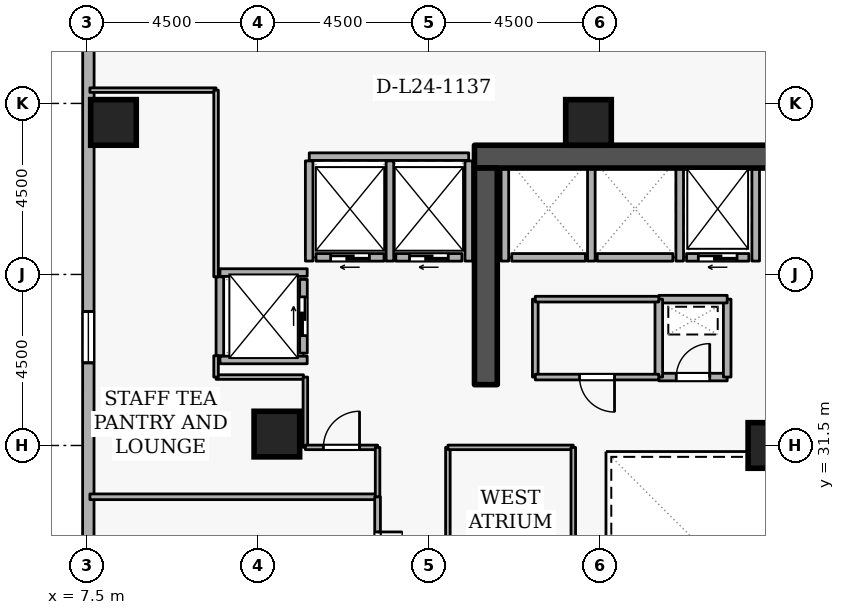
"""IFC4 building model, lengths in metres.
Left out: names, types, materials, properties, quantities, classifications, styles, units other than length and angle.
Written with IfcOpenShell. Run it as: python <this file> out.ifc"""

import sys

from ifc_helpers import new_model, si_unit, direction, frame, frame_2d, origin, origin_2d, place, context, subcontext, project, spatial, rectangle, extrude, element, fill, save


model = new_model("IFC4")
c1 = context("Model", 3, precision=1e-05, world=origin(), true_north=direction((0.0, 1.0)))
c2 = subcontext(c1, "Body", "Model", "MODEL_VIEW")
j1 = project(units=[si_unit("LENGTHUNIT", "METRE"), si_unit("PLANEANGLEUNIT", "RADIAN")], contexts=[c1])
p1 = place(None, origin())
s1 = spatial("IfcSite", under=j1, at=p1, CompositionType="ELEMENT")
p2 = place(p1, origin())
s2 = spatial("IfcBuilding", under=s1, at=p2, CompositionType="ELEMENT")
p3 = place(p2, frame((0.0, 0.0, 94.5)))
s3 = spatial("IfcBuildingStorey", under=s2, at=p3, CompositionType="ELEMENT", Elevation=94.5)
p4 = place(p3, frame((17.7, 39.1, 0.0), z_axis=(0.0, 0.0, 1.0), x_axis=(1.0, 0.0, 0.0)))
e1 = element("IfcWall", 1, at=p4, inside=s3, PredefinedType="SHEAR", context=c2, shape_type="SweptSolid", body=[
    extrude(rectangle(XDim=15.6, YDim=0.6, at=frame_2d((7.8, 0.0))), origin(), (0.0, 0.0, 1.0), 3.6),
])
p5 = place(p3, frame((18.0, 33.1, 0.0), z_axis=(0.0, 0.0, 1.0), x_axis=(0.0, 1.0, 0.0)))
e2 = element("IfcWall", 2, at=p5, inside=s3, PredefinedType="SHEAR", context=c2, shape_type="SweptSolid", body=[
    extrude(rectangle(XDim=5.7, YDim=0.6, at=frame_2d((2.85, 0.0))), origin(), (0.0, 0.0, 1.0), 3.6),
])
for number, where, z_axis, x_axis in (
    (3, (8.2, 40.0, 0.0), (0.0, 0.0, 1.0), (1.0, 0.0, 0.0)),
    (4, (12.5, 31.8, 0.0), (0.0, 0.0, 1.0), (1.0, 0.0, 0.0)),
    (5, (20.7, 40.0, 0.0), (0.0, 0.0, 1.0), (1.0, 0.0, 0.0)),
    (6, (25.5, 31.5, 0.0), (0.0, 0.0, 1.0), (1.0, 0.0, 0.0)),
):
    element("IfcColumn", number, at=place(p3, frame(where, z_axis=z_axis, x_axis=x_axis)), inside=s3, PredefinedType="COLUMN", context=c2, shape_type="SweptSolid", body=[
        extrude(rectangle(XDim=1.2, YDim=1.2, at=origin_2d()), origin(), (0.0, 0.0, 1.0), 3.6),
    ])
p6 = place(p3, frame((7.542, 46.425, 0.0), z_axis=(0.0, 0.0, 1.0), x_axis=(-0.000182370391, -0.999999983371, 0.0)))
e7 = element("IfcWall", 7, at=p6, inside=s3, PredefinedType="STANDARD", context=c2, shape_type="SweptSolid", body=[
    extrude(rectangle(XDim=34.806, YDim=0.3, at=frame_2d((17.403, 0.0))), origin(), (0.0, 0.0, 1.0), 2.22),
])
p7 = place(p6, frame((1.8, 0.0, 0.72)))
e8 = element("IfcOpeningElement", 8, at=p7, cuts=e7, PredefinedType="OPENING", context=c2, shape_type="SweptSolid", body=[
    extrude(rectangle(XDim=1.35, YDim=1.05, at=frame_2d((0.675, 0.525))), frame((0.0, 0.16, 0.0), z_axis=(0.0, -1.0, 0.0), x_axis=(1.0, 0.0, 0.0)), (0.0, 0.0, 1.0), 0.32),
])
p8 = place(p6, frame((11.4, 0.0, 0.72)))
e9 = element("IfcOpeningElement", 9, at=p8, cuts=e7, PredefinedType="OPENING", context=c2, shape_type="SweptSolid", body=[
    extrude(rectangle(XDim=1.35, YDim=1.05, at=frame_2d((0.675, 0.525))), frame((0.0, 0.16, 0.0), z_axis=(0.0, -1.0, 0.0), x_axis=(1.0, 0.0, 0.0)), (0.0, 0.0, 1.0), 0.32),
])
p9 = place(p6, frame((21.0, 0.0, 0.72)))
e10 = element("IfcOpeningElement", 10, at=p9, cuts=e7, PredefinedType="OPENING", context=c2, shape_type="SweptSolid", body=[
    extrude(rectangle(XDim=1.35, YDim=1.05, at=frame_2d((0.675, 0.525))), frame((0.0, 0.16, 0.0), z_axis=(0.0, -1.0, 0.0), x_axis=(1.0, 0.0, 0.0)), (0.0, 0.0, 1.0), 0.32),
])
p10 = place(p6, frame((25.8, 0.0, 0.72)))
e11 = element("IfcOpeningElement", 11, at=p10, cuts=e7, PredefinedType="OPENING", context=c2, shape_type="SweptSolid", body=[
    extrude(rectangle(XDim=1.35, YDim=1.05, at=frame_2d((0.675, 0.525))), frame((0.0, 0.16, 0.0), z_axis=(0.0, -1.0, 0.0), x_axis=(1.0, 0.0, 0.0)), (0.0, 0.0, 1.0), 0.32),
])
p11 = place(p3, frame((24.92, 36.45, 0.0), z_axis=(0.0, 0.0, 1.0), x_axis=(-1.0, 0.0, 0.0)))
e12 = element("IfcWall", 12, at=p11, inside=s3, PredefinedType="STANDARD", context=c2, shape_type="SweptSolid", body=[
    extrude(rectangle(XDim=1.64, YDim=0.2, at=frame_2d((0.82, 0.0))), origin(), (0.0, 0.0, 1.0), 3.3),
])
p12 = place(p11, frame((0.31, 0.0, 0.0)))
e13 = element("IfcOpeningElement", 13, at=p12, cuts=e12, PredefinedType="OPENING", context=c2, shape_type="SweptSolid", body=[
    extrude(rectangle(XDim=1.02, YDim=2.06, at=frame_2d((0.51, 1.03))), frame((0.0, 0.11, 0.0), z_axis=(0.0, -1.0, 0.0), x_axis=(1.0, 0.0, 0.0)), (0.0, 0.0, 1.0), 0.22),
])
p13 = place(p3, frame((22.92, 36.45, 0.0), z_axis=(0.0, 0.0, 1.0), x_axis=(-1.0, 0.0, 0.0)))
e14 = element("IfcWall", 14, at=p13, inside=s3, PredefinedType="STANDARD", context=c2, shape_type="SweptSolid", body=[
    extrude(rectangle(XDim=1.99, YDim=0.2, at=frame_2d((0.995, 0.0))), origin(), (0.0, 0.0, 1.0), 3.3),
])
p14 = place(p3, frame((20.62, 36.45, 0.0), z_axis=(0.0, 0.0, 1.0), x_axis=(-1.0, 0.0, 0.0)))
e15 = element("IfcWall", 15, at=p14, inside=s3, PredefinedType="STANDARD", context=c2, shape_type="SweptSolid", body=[
    extrude(rectangle(XDim=1.94, YDim=0.2, at=frame_2d((0.97, 0.0))), origin(), (0.0, 0.0, 1.0), 3.3),
])
p15 = place(p3, frame((17.37, 36.45, 0.0), z_axis=(0.0, 0.0, 1.0), x_axis=(-1.0, 0.0, 0.0)))
e16 = element("IfcWall", 16, at=p15, inside=s3, PredefinedType="STANDARD", context=c2, shape_type="SweptSolid", body=[
    extrude(rectangle(XDim=1.74, YDim=0.2, at=frame_2d((0.87, 0.0))), origin(), (0.0, 0.0, 1.0), 3.3),
])
p16 = place(p15, frame((0.36, 0.0, 0.0)))
e17 = element("IfcOpeningElement", 17, at=p16, cuts=e16, PredefinedType="OPENING", context=c2, shape_type="SweptSolid", body=[
    extrude(rectangle(XDim=1.02, YDim=2.06, at=frame_2d((0.51, 1.03))), frame((0.0, 0.11, 0.0), z_axis=(0.0, -1.0, 0.0), x_axis=(1.0, 0.0, 0.0)), (0.0, 0.0, 1.0), 0.22),
])
p17 = place(p3, frame((15.32, 36.45, 0.0), z_axis=(0.0, 0.0, 1.0), x_axis=(-1.0, 0.0, 0.0)))
e18 = element("IfcWall", 18, at=p17, inside=s3, PredefinedType="STANDARD", context=c2, shape_type="SweptSolid", body=[
    extrude(rectangle(XDim=1.79, YDim=0.2, at=frame_2d((0.895, 0.0))), origin(), (0.0, 0.0, 1.0), 3.3),
])
p18 = place(p17, frame((0.385, 0.0, 0.0)))
e19 = element("IfcOpeningElement", 19, at=p18, cuts=e18, PredefinedType="OPENING", context=c2, shape_type="SweptSolid", body=[
    extrude(rectangle(XDim=1.02, YDim=2.06, at=frame_2d((0.51, 1.03))), frame((0.0, 0.11, 0.0), z_axis=(0.0, -1.0, 0.0), x_axis=(1.0, 0.0, 0.0)), (0.0, 0.0, 1.0), 0.22),
])
p19 = place(p3, frame((13.2, 33.93, 0.0), z_axis=(0.0, 0.0, 1.0), x_axis=(0.0, 1.0, 0.0)))
e20 = element("IfcWall", 20, at=p19, inside=s3, PredefinedType="STANDARD", context=c2, shape_type="SweptSolid", body=[
    extrude(rectangle(XDim=1.94, YDim=0.2, at=frame_2d((0.97, 0.0))), origin(), (0.0, 0.0, 1.0), 3.3),
])
p20 = place(p19, frame((0.46, 0.0, 0.0)))
e21 = element("IfcOpeningElement", 21, at=p20, cuts=e20, PredefinedType="OPENING", context=c2, shape_type="SweptSolid", body=[
    extrude(rectangle(XDim=1.02, YDim=2.06, at=frame_2d((0.51, 1.03))), frame((0.0, 0.11, 0.0), z_axis=(0.0, -1.0, 0.0), x_axis=(1.0, 0.0, 0.0)), (0.0, 0.0, 1.0), 0.22),
])
p21 = place(p3, frame((25.1, 36.352, 0.0), z_axis=(0.0, 0.0, 1.0), x_axis=(0.0, 1.0, 0.0)))
e22 = element("IfcWall", 22, at=p21, inside=s3, PredefinedType="STANDARD", context=c2, shape_type="SweptSolid", body=[
    extrude(rectangle(XDim=2.436, YDim=0.2, at=frame_2d((1.218, 0.0))), origin(), (0.0, 0.0, 1.0), 1.685),
])
for number, where, z_axis, x_axis in (
    (23, (23.1, 36.352, 0.0), (0.0, 0.0, 1.0), (0.0, 1.0, 0.0)),
    (24, (20.775, 36.352, 0.0), (0.0, 0.0, 1.0), (0.0, 1.0, 0.0)),
    (25, (18.5, 36.352, 0.0), (0.0, 0.0, 1.0), (0.0, 1.0, 0.0)),
):
    element("IfcWall", number, at=place(p3, frame(where, z_axis=z_axis, x_axis=x_axis)), inside=s3, PredefinedType="STANDARD", context=c2, shape_type="SweptSolid", body=[
        extrude(rectangle(XDim=2.436, YDim=0.2, at=frame_2d((1.218, 0.0))), origin(), (0.0, 0.0, 1.0), 3.3),
    ])
p22 = place(p3, frame((13.352, 39.1, 0.0), z_axis=(0.0, 0.0, 1.0), x_axis=(1.0, 0.0, 0.0)))
e26 = element("IfcWall", 26, at=p22, inside=s3, PredefinedType="STANDARD", context=c2, shape_type="SweptSolid", body=[
    extrude(rectangle(XDim=4.196, YDim=0.2, at=frame_2d((2.098, 0.0))), origin(), (0.0, 0.0, 1.0), 3.3),
])
p23 = place(p3, frame((17.55, 36.352, 0.0), z_axis=(0.0, 0.0, 1.0), x_axis=(0.0, 1.0, 0.0)))
e27 = element("IfcWall", 27, at=p23, inside=s3, PredefinedType="STANDARD", context=c2, shape_type="SweptSolid", body=[
    extrude(rectangle(XDim=2.636, YDim=0.2, at=frame_2d((1.318, 0.0))), origin(), (0.0, 0.0, 1.0), 2.505),
])
for number, where, z_axis, x_axis in (
    (28, (15.475, 36.352, 0.0), (0.0, 0.0, 1.0), (0.0, 1.0, 0.0)),
    (29, (13.35, 36.352, 0.0), (0.0, 0.0, 1.0), (0.0, 1.0, 0.0)),
):
    element("IfcWall", number, at=place(p3, frame(where, z_axis=z_axis, x_axis=x_axis)), inside=s3, PredefinedType="STANDARD", context=c2, shape_type="SweptSolid", body=[
        extrude(rectangle(XDim=2.636, YDim=0.2, at=frame_2d((1.318, 0.0))), origin(), (0.0, 0.0, 1.0), 3.3),
    ])
for number, where, z_axis, x_axis in (
    (30, (11.002, 36.05, 0.0), (0.0, 0.0, 1.0), (1.0, 0.0, 0.0)),
    (31, (11.002, 33.75, 0.0), (0.0, 0.0, 1.0), (1.0, 0.0, 0.0)),
):
    element("IfcWall", number, at=place(p3, frame(where, z_axis=z_axis, x_axis=x_axis)), inside=s3, PredefinedType="STANDARD", context=c2, shape_type="SweptSolid", body=[
        extrude(rectangle(XDim=2.296, YDim=0.2, at=frame_2d((1.148, 0.0))), origin(), (0.0, 0.0, 1.0), 3.3),
    ])
p24 = place(p3, frame((11.0, 33.862, 0.0), z_axis=(0.0, 0.0, 1.0), x_axis=(0.0, 1.0, 0.0)))
e32 = element("IfcWall", 32, at=p24, inside=s3, PredefinedType="STANDARD", context=c2, shape_type="SweptSolid", body=[
    extrude(rectangle(XDim=2.076, YDim=0.2, at=frame_2d((1.038, 0.0))), origin(), (0.0, 0.0, 1.0), 3.3),
])
p25 = place(p3, frame((22.55, 33.3, 0.0), z_axis=(0.0, 0.0, 1.0), x_axis=(1.0, 0.0, 0.0)))
e33 = element("IfcWall", 33, at=p25, inside=s3, PredefinedType="STANDARD", context=c2, shape_type="SweptSolid", body=[
    extrude(rectangle(XDim=1.8, YDim=0.2, at=frame_2d((0.9, 0.0))), origin(), (0.0, 0.0, 1.0), 3.3),
])
p26 = place(p25, frame((0.46, 0.0, 0.0)))
e34 = element("IfcOpeningElement", 34, at=p26, cuts=e33, PredefinedType="OPENING", context=c2, shape_type="SweptSolid", body=[
    extrude(rectangle(XDim=0.88, YDim=2.04, at=frame_2d((0.44, 1.02))), frame((0.0, 0.11, 0.0), z_axis=(0.0, -1.0, 0.0), x_axis=(1.0, 0.0, 0.0)), (0.0, 0.0, 1.0), 0.22),
])
p27 = place(p3, frame((24.35, 33.3, 0.0), z_axis=(0.0, 0.0, 1.0), x_axis=(0.0, 1.0, 0.0)))
e35 = element("IfcWall", 35, at=p27, inside=s3, PredefinedType="STANDARD", context=c2, shape_type="SweptSolid", body=[
    extrude(rectangle(XDim=2.05, YDim=0.2, at=frame_2d((1.025, 0.0))), origin(), (0.0, 0.0, 1.0), 3.3),
])
p28 = place(p3, frame((24.35, 35.35, 0.0), z_axis=(0.0, 0.0, 1.0), x_axis=(-1.0, 0.0, 0.0)))
e36 = element("IfcWall", 36, at=p28, inside=s3, PredefinedType="STANDARD", context=c2, shape_type="SweptSolid", body=[
    extrude(rectangle(XDim=1.8, YDim=0.2, at=frame_2d((0.9, 0.0))), origin(), (0.0, 0.0, 1.0), 3.3),
])
p29 = place(p3, frame((22.55, 35.35, 0.0), z_axis=(0.0, 0.0, 1.0), x_axis=(0.0, -1.0, 0.0)))
e37 = element("IfcWall", 37, at=p29, inside=s3, PredefinedType="STANDARD", context=c2, shape_type="SweptSolid", body=[
    extrude(rectangle(XDim=2.05, YDim=0.2, at=frame_2d((1.025, 0.0))), origin(), (0.0, 0.0, 1.0), 3.3),
])
p30 = place(p3, frame((19.3, 33.3, 0.0), z_axis=(0.0, 0.0, 1.0), x_axis=(0.0, 1.0, 0.0)))
e38 = element("IfcWall", 38, at=p30, inside=s3, PredefinedType="PARTITIONING", context=c2, shape_type="SweptSolid", body=[
    extrude(rectangle(XDim=2.05, YDim=0.15, at=frame_2d((1.025, 0.0))), origin(), (0.0, 0.0, 1.0), 3.3),
])
p31 = place(p3, frame((19.3, 35.35, 0.0), z_axis=(0.0, 0.0, 1.0), x_axis=(1.0, 0.0, 0.0)))
e39 = element("IfcWall", 39, at=p31, inside=s3, PredefinedType="PARTITIONING", context=c2, shape_type="SweptSolid", body=[
    extrude(rectangle(XDim=3.25, YDim=0.15, at=frame_2d((1.625, 0.0))), origin(), (0.0, 0.0, 1.0), 3.3),
])
p32 = place(p3, frame((22.55, 33.3, 0.0), z_axis=(0.0, 0.0, 1.0), x_axis=(-1.0, 0.0, 0.0)))
e40 = element("IfcWall", 40, at=p32, inside=s3, PredefinedType="PARTITIONING", context=c2, shape_type="SweptSolid", body=[
    extrude(rectangle(XDim=3.25, YDim=0.15, at=frame_2d((1.625, 0.0))), origin(), (0.0, 0.0, 1.0), 3.3),
])
p33 = place(p32, frame((1.165, 0.0, 0.0)))
e41 = element("IfcOpeningElement", 41, at=p33, cuts=e40, PredefinedType="OPENING", context=c2, shape_type="SweptSolid", body=[
    extrude(rectangle(XDim=0.92, YDim=2.08, at=frame_2d((0.46, 1.04))), frame((0.0, 0.085, 0.0), z_axis=(0.0, -1.0, 0.0), x_axis=(1.0, 0.0, 0.0)), (0.0, 0.0, 1.0), 0.17),
])
p34 = place(p3, frame((7.58, 30.15, 0.0), z_axis=(0.0, 0.0, 1.0), x_axis=(1.0, 0.0, 0.0)))
e42 = element("IfcWall", 42, at=p34, inside=s3, PredefinedType="PARTITIONING", context=c2, shape_type="SweptSolid", body=[
    extrude(rectangle(XDim=7.57, YDim=0.15, at=frame_2d((3.785, 0.0))), origin(), (0.0, 0.0, 1.0), 3.3),
])
p35 = place(p3, frame((15.15, 30.15, 0.0), z_axis=(0.0, 0.0, 1.0), x_axis=(0.0, -1.0, 0.0)))
e43 = element("IfcWall", 43, at=p35, inside=s3, PredefinedType="PARTITIONING", context=c2, shape_type="SweptSolid", body=[
    extrude(rectangle(XDim=3.15, YDim=0.15, at=frame_2d((1.575, 0.0))), origin(), (0.0, 0.0, 1.0), 3.3),
])
p36 = place(p35, frame((0.925, 0.0, 0.0)))
e44 = element("IfcOpeningElement", 44, at=p36, cuts=e43, PredefinedType="OPENING", context=c2, shape_type="SweptSolid", body=[
    extrude(rectangle(XDim=1.3, YDim=2.12, at=frame_2d((0.65, 1.06))), frame((0.0, 0.085, 0.0), z_axis=(0.0, -1.0, 0.0), x_axis=(1.0, 0.0, 0.0)), (0.0, 0.0, 1.0), 0.17),
])
p37 = place(p3, frame((10.9, 33.3, 0.0), z_axis=(0.0, 0.0, 1.0), x_axis=(1.0, 0.0, 0.0)))
e45 = element("IfcWall", 45, at=p37, inside=s3, PredefinedType="PARTITIONING", context=c2, shape_type="SweptSolid", body=[
    extrude(rectangle(XDim=2.3, YDim=0.12, at=frame_2d((1.15, 0.0))), origin(), (0.0, 0.0, 1.0), 3.3),
])
p38 = place(p3, frame((13.25, 33.3, 0.0), z_axis=(0.0, 0.0, 1.0), x_axis=(0.0, -1.0, 0.0)))
e46 = element("IfcWall", 46, at=p38, inside=s3, PredefinedType="PARTITIONING", context=c2, shape_type="SweptSolid", body=[
    extrude(rectangle(XDim=1.85, YDim=0.12, at=frame_2d((0.925, 0.0))), origin(), (0.0, 0.0, 1.0), 3.3),
])
p39 = place(p3, frame((13.25, 31.45, 0.0), z_axis=(0.0, 0.0, 1.0), x_axis=(1.0, 0.0, 0.0)))
e47 = element("IfcWall", 47, at=p39, inside=s3, PredefinedType="PARTITIONING", context=c2, shape_type="SweptSolid", body=[
    extrude(rectangle(XDim=1.9, YDim=0.12, at=frame_2d((0.95, 0.0))), origin(), (0.0, 0.0, 1.0), 3.3),
])
p40 = place(p39, frame((0.475, 0.0, 0.0)))
e48 = element("IfcOpeningElement", 48, at=p40, cuts=e47, PredefinedType="OPENING", context=c2, shape_type="SweptSolid", body=[
    extrude(rectangle(XDim=0.95, YDim=2.1, at=frame_2d((0.475, 1.05))), frame((0.0, 0.07, 0.0), z_axis=(0.0, -1.0, 0.0), x_axis=(1.0, 0.0, 0.0)), (0.0, 0.0, 1.0), 0.14),
])
p41 = place(p3, frame((15.15, 31.45, 0.0), z_axis=(0.0, 0.0, 1.0), x_axis=(0.0, -1.0, 0.0)))
e49 = element("IfcWall", 49, at=p41, inside=s3, PredefinedType="PARTITIONING", context=c2, shape_type="SweptSolid", body=[
    extrude(rectangle(XDim=1.3, YDim=0.12, at=frame_2d((0.65, 0.0))), origin(), (0.0, 0.0, 1.0), 3.3),
])
p42 = place(p3, frame((7.58, 40.85, 0.0), z_axis=(0.0, 0.0, 1.0), x_axis=(1.0, 0.0, 0.0)))
e50 = element("IfcWall", 50, at=p42, inside=s3, PredefinedType="PARTITIONING", context=c2, shape_type="SweptSolid", body=[
    extrude(rectangle(XDim=3.32, YDim=0.12, at=frame_2d((1.66, 0.0))), origin(), (0.0, 0.0, 1.0), 3.3),
])
p43 = place(p3, frame((10.9, 40.85, 0.0), z_axis=(0.0, 0.0, 1.0), x_axis=(0.0, -1.0, 0.0)))
e51 = element("IfcWall", 51, at=p43, inside=s3, PredefinedType="PARTITIONING", context=c2, shape_type="SweptSolid", body=[
    extrude(rectangle(XDim=4.912, YDim=0.12, at=frame_2d((2.456, 0.0))), origin(), (0.0, 0.0, 1.0), 3.3),
])
p44 = place(p3, frame((10.9, 33.862, 0.0), z_axis=(0.0, 0.0, 1.0), x_axis=(0.0, -1.0, 0.0)))
e52 = element("IfcWall", 52, at=p44, inside=s3, PredefinedType="PARTITIONING", context=c2, shape_type="SweptSolid", body=[
    extrude(rectangle(XDim=0.562, YDim=0.12, at=frame_2d((0.281, 0.0))), origin(), (0.0, 0.0, 1.0), 3.3),
])
p45 = place(p3, frame((17.0, 22.55, 0.0), z_axis=(0.0, 0.0, 1.0), x_axis=(0.0, 1.0, 0.0)))
e53 = element("IfcWall", 53, at=p45, inside=s3, PredefinedType="PARTITIONING", context=c2, shape_type="SweptSolid", body=[
    extrude(rectangle(XDim=8.9, YDim=0.12, at=frame_2d((4.45, 0.0))), origin(), (0.0, 0.0, 1.0), 3.3),
])
p46 = place(p45, frame((2.875, 0.0, 0.0)))
e54 = element("IfcOpeningElement", 54, at=p46, cuts=e53, PredefinedType="OPENING", context=c2, shape_type="SweptSolid", body=[
    extrude(rectangle(XDim=0.95, YDim=2.1, at=frame_2d((0.475, 1.05))), frame((0.0, 0.07, 0.0), z_axis=(0.0, -1.0, 0.0), x_axis=(1.0, 0.0, 0.0)), (0.0, 0.0, 1.0), 0.14),
])
p47 = place(p3, frame((17.0, 31.45, 0.0), z_axis=(0.0, 0.0, 1.0), x_axis=(1.0, 0.0, 0.0)))
e55 = element("IfcWall", 55, at=p47, inside=s3, PredefinedType="PARTITIONING", context=c2, shape_type="SweptSolid", body=[
    extrude(rectangle(XDim=3.3, YDim=0.12, at=frame_2d((1.65, 0.0))), origin(), (0.0, 0.0, 1.0), 3.3),
])
p48 = place(p3, frame((20.3, 31.45, 0.0), z_axis=(0.0, 0.0, 1.0), x_axis=(0.0, -1.0, 0.0)))
e56 = element("IfcWall", 56, at=p48, inside=s3, PredefinedType="PARTITIONING", context=c2, shape_type="SweptSolid", body=[
    extrude(rectangle(XDim=8.9, YDim=0.12, at=frame_2d((4.45, 0.0))), origin(), (0.0, 0.0, 1.0), 3.3),
])
p49 = place(p8, origin())
e57 = element("IfcWindow", 57, at=p49, inside=s3, PartitioningType="SINGLE_PANEL", PredefinedType="WINDOW", context=c2, shape_type="SweptSolid", body=[
    extrude(rectangle(XDim=1.35, YDim=1.05, at=frame_2d((0.675, 0.525))), frame((0.0, 0.03, 0.0), z_axis=(0.0, -1.0, 0.0), x_axis=(1.0, 0.0, 0.0)), (0.0, 0.0, 1.0), 0.06),
])
fill(e9, e57)
p50 = place(p12, origin())
e58 = element("IfcDoor", 58, at=p50, inside=s3, OperationType="SLIDING_TO_LEFT", PredefinedType="DOOR", context=c2, shape_type="SweptSolid", body=[
    extrude(rectangle(XDim=1.02, YDim=2.06, at=frame_2d((0.51, 1.03))), frame((0.0, 0.025, 0.0), z_axis=(0.0, -1.0, 0.0), x_axis=(1.0, 0.0, 0.0)), (0.0, 0.0, 1.0), 0.05),
])
fill(e13, e58)
p51 = place(p16, origin())
e59 = element("IfcDoor", 59, at=p51, inside=s3, OperationType="SLIDING_TO_LEFT", PredefinedType="DOOR", context=c2, shape_type="SweptSolid", body=[
    extrude(rectangle(XDim=1.02, YDim=2.06, at=frame_2d((0.51, 1.03))), frame((0.0, 0.025, 0.0), z_axis=(0.0, -1.0, 0.0), x_axis=(1.0, 0.0, 0.0)), (0.0, 0.0, 1.0), 0.05),
])
fill(e17, e59)
p52 = place(p18, origin())
e60 = element("IfcDoor", 60, at=p52, inside=s3, OperationType="SLIDING_TO_LEFT", PredefinedType="DOOR", context=c2, shape_type="SweptSolid", body=[
    extrude(rectangle(XDim=1.02, YDim=2.06, at=frame_2d((0.51, 1.03))), frame((0.0, 0.025, 0.0), z_axis=(0.0, -1.0, 0.0), x_axis=(1.0, 0.0, 0.0)), (0.0, 0.0, 1.0), 0.05),
])
fill(e19, e60)
p53 = place(p20, origin())
e61 = element("IfcDoor", 61, at=p53, inside=s3, OperationType="SLIDING_TO_LEFT", PredefinedType="DOOR", context=c2, shape_type="SweptSolid", body=[
    extrude(rectangle(XDim=1.02, YDim=2.06, at=frame_2d((0.51, 1.03))), frame((0.0, 0.025, 0.0), z_axis=(0.0, -1.0, 0.0), x_axis=(1.0, 0.0, 0.0)), (0.0, 0.0, 1.0), 0.05),
])
fill(e21, e61)
p54 = place(p26, origin())
e62 = element("IfcDoor", 62, at=p54, inside=s3, OperationType="SINGLE_SWING_RIGHT", PredefinedType="DOOR", context=c2, shape_type="SweptSolid", body=[
    extrude(rectangle(XDim=0.88, YDim=2.04, at=frame_2d((0.44, 1.02))), frame((0.0, 0.025, 0.0), z_axis=(0.0, -1.0, 0.0), x_axis=(1.0, 0.0, 0.0)), (0.0, 0.0, 1.0), 0.05),
])
fill(e34, e62)
p55 = place(p33, origin())
e63 = element("IfcDoor", 63, at=p55, inside=s3, OperationType="SINGLE_SWING_LEFT", PredefinedType="DOOR", context=c2, shape_type="SweptSolid", body=[
    extrude(rectangle(XDim=0.92, YDim=2.08, at=frame_2d((0.46, 1.04))), frame((0.0, 0.025, 0.0), z_axis=(0.0, -1.0, 0.0), x_axis=(1.0, 0.0, 0.0)), (0.0, 0.0, 1.0), 0.05),
])
fill(e41, e63)
p56 = place(p36, origin())
e64 = element("IfcDoor", 64, at=p56, inside=s3, OperationType="DOUBLE_DOOR_SINGLE_SWING", PredefinedType="DOOR", context=c2, shape_type="SweptSolid", body=[
    extrude(rectangle(XDim=1.3, YDim=2.12, at=frame_2d((0.65, 1.06))), frame((0.0, 0.025, 0.0), z_axis=(0.0, -1.0, 0.0), x_axis=(1.0, 0.0, 0.0)), (0.0, 0.0, 1.0), 0.05),
])
fill(e44, e64)
p57 = place(p40, origin())
e65 = element("IfcDoor", 65, at=p57, inside=s3, OperationType="SINGLE_SWING_RIGHT", PredefinedType="DOOR", context=c2, shape_type="SweptSolid", body=[
    extrude(rectangle(XDim=0.95, YDim=2.1, at=frame_2d((0.475, 1.05))), frame((0.0, 0.025, 0.0), z_axis=(0.0, -1.0, 0.0), x_axis=(1.0, 0.0, 0.0)), (0.0, 0.0, 1.0), 0.05),
])
fill(e48, e65)
save(model, sys.argv[1])
